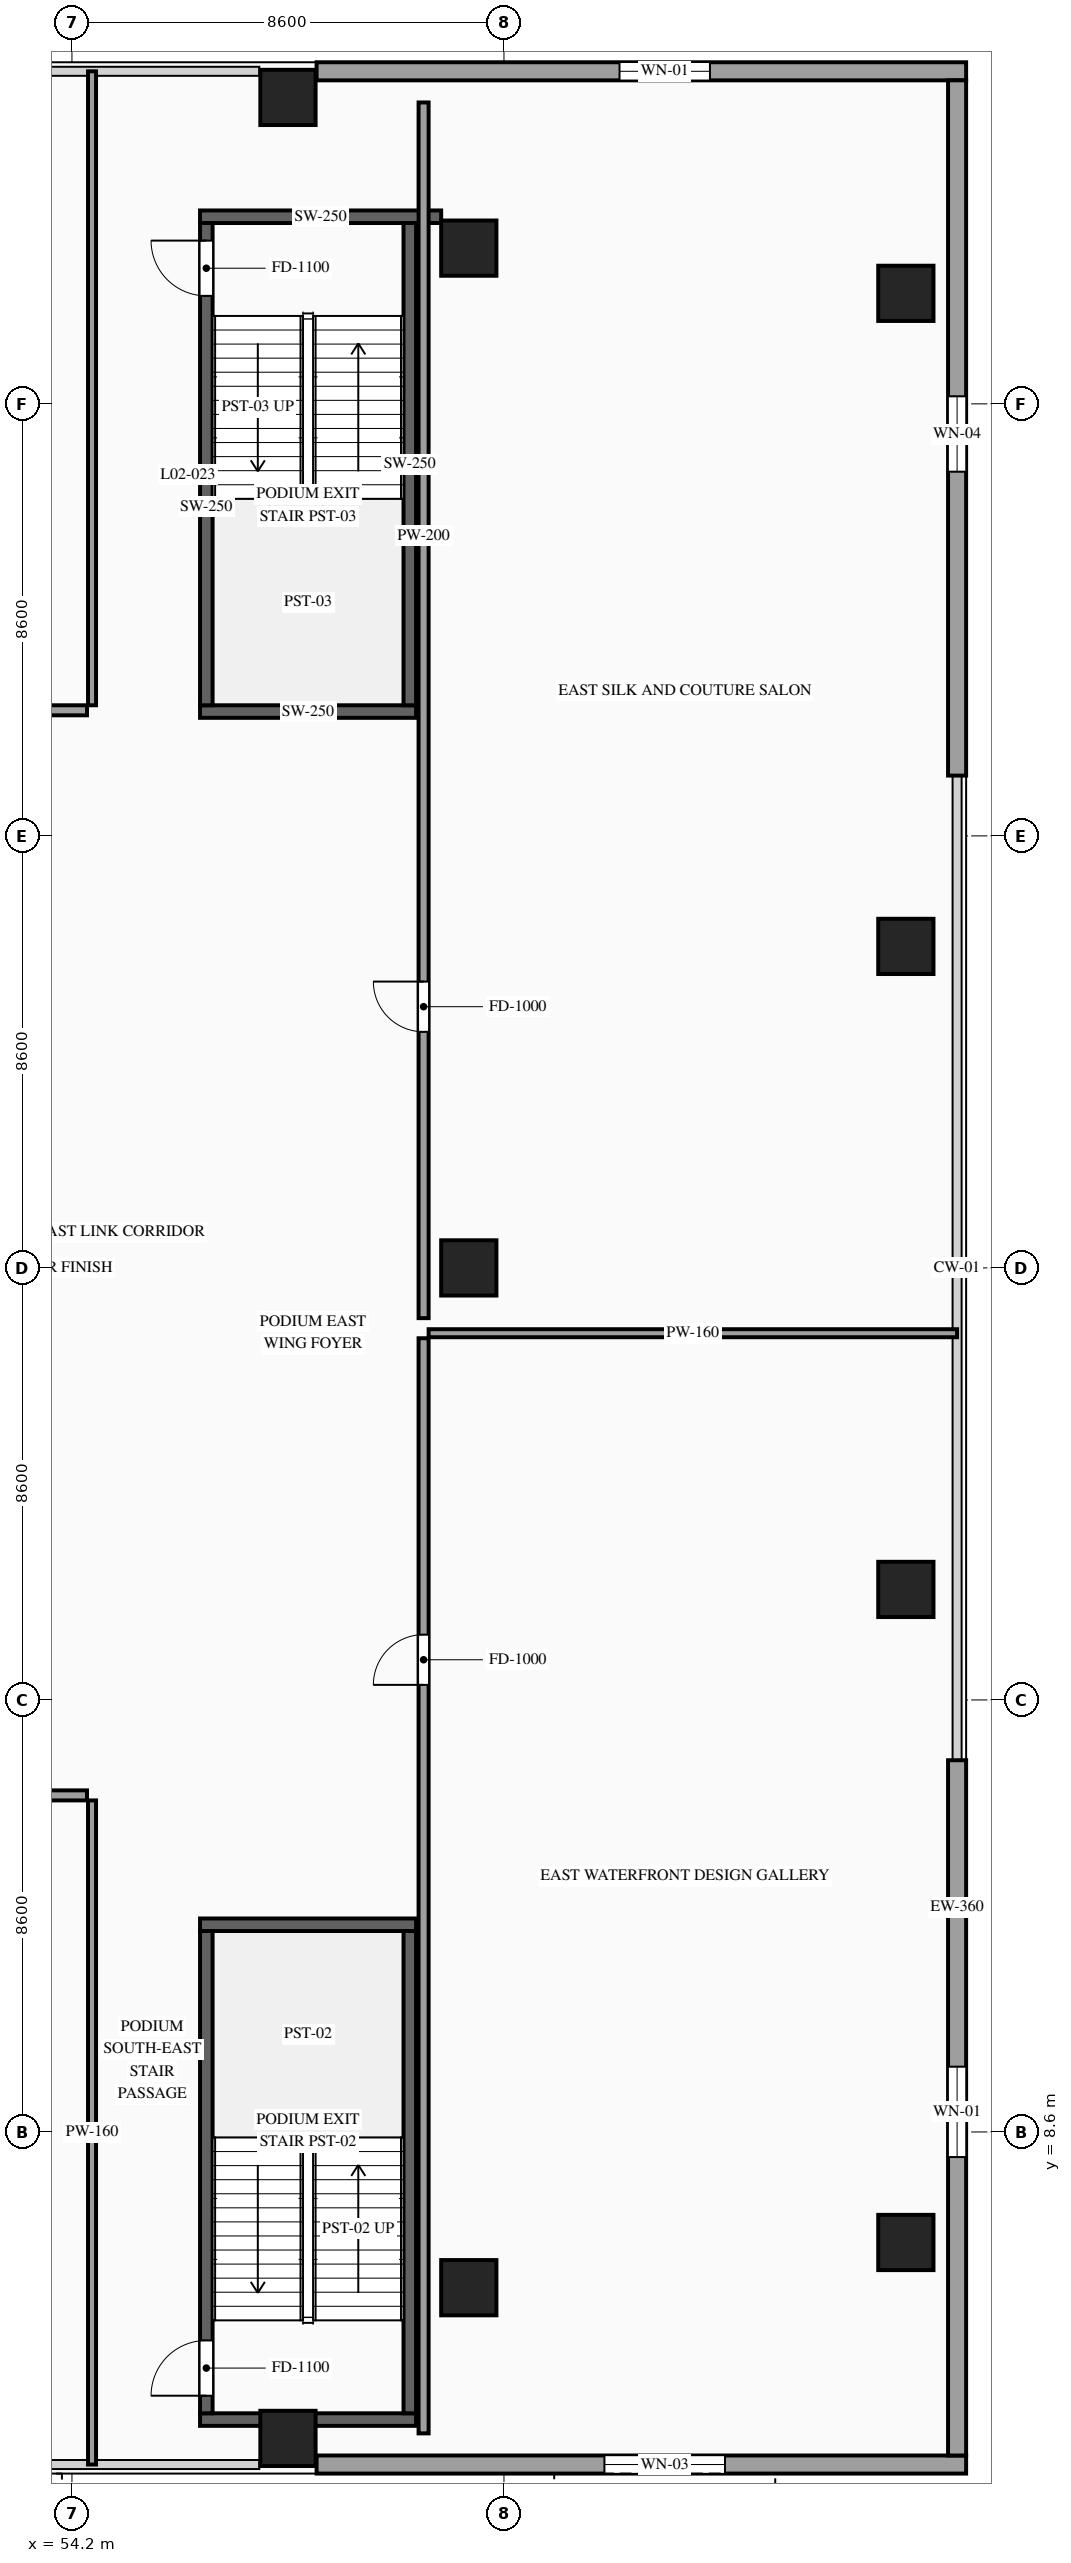
"""IFC4 building model, lengths in metres.
Left out: names, types, materials, properties, quantities, classifications, styles, units other than length and angle.
Written with IfcOpenShell. Run it as: python <this file> out.ifc"""

import sys

from ifc_helpers import new_model, si_unit, direction, frame, frame_2d, origin, origin_2d, place, context, subcontext, project, spatial, rectangle, extrude, source, transform, mapped, element, fill, save


model = new_model("IFC4")
c1 = context("Model", 3, precision=1e-05, world=origin(), true_north=direction((0.0, 1.0)))
c2 = subcontext(c1, "Body", "Model", "MODEL_VIEW")
j1 = project(units=[si_unit("LENGTHUNIT", "METRE"), si_unit("PLANEANGLEUNIT", "RADIAN")], contexts=[c1])
p1 = place(None, origin())
s1 = spatial("IfcSite", under=j1, at=p1, CompositionType="ELEMENT")
p2 = place(p1, origin())
s2 = spatial("IfcBuilding", under=s1, at=p2, CompositionType="ELEMENT")
p3 = place(p2, frame((0.0, 0.0, 5.4)))
s3 = spatial("IfcBuildingStorey", under=s2, at=p3, CompositionType="ELEMENT", Elevation=5.4)
m1 = source(origin(), c2, "Body", "SweptSolid", [
    extrude(rectangle(XDim=1.1, YDim=1.1, at=origin_2d()), origin(), (0.0, 0.0, 1.0), 4.8),
])
for number, where, z_axis, x_axis in (
    (1, (70.8, 6.4, 0.0), (0.0, 0.0, 1.0), (1.0, 0.0, 0.0)),
    (2, (70.8, 19.4, 0.0), (0.0, 0.0, 1.0), (1.0, 0.0, 0.0)),
    (3, (70.8, 32.2, 0.0), (0.0, 0.0, 1.0), (1.0, 0.0, 0.0)),
    (4, (70.8, 45.2, 0.0), (0.0, 0.0, 1.0), (1.0, 0.0, 0.0)),
    (5, (62.1, 5.5, 0.0), (0.0, 0.0, 1.0), (1.0, 0.0, 0.0)),
    (6, (62.1, 25.8, 0.0), (0.0, 0.0, 1.0), (1.0, 0.0, 0.0)),
    (7, (62.1, 46.1, 0.0), (0.0, 0.0, 1.0), (1.0, 0.0, 0.0)),
    (8, (58.5, 2.5, 0.0), (0.0, 0.0, 1.0), (1.0, 0.0, 0.0)),
    (9, (58.5, 49.1, 0.0), (0.0, 0.0, 1.0), (1.0, 0.0, 0.0)),
):
    element("IfcColumn", number, at=place(p3, frame(where, z_axis=z_axis, x_axis=x_axis)), inside=s3, PredefinedType="COLUMN", context=c2, shape_type="MappedRepresentation", body=[
        mapped(m1, transform((0.0, 0.0, 0.0), scale=1.0)),
    ])
p4 = place(p3, frame((59.07, 1.98, 0.0), z_axis=(0.0, 0.0, 1.0), x_axis=(1.0, 0.0, 0.0)))
e10 = element("IfcWall", 10, at=p4, inside=s3, PredefinedType="SOLIDWALL", context=c2, shape_type="SweptSolid", body=[
    extrude(rectangle(XDim=12.93, YDim=0.36, at=frame_2d((6.465, 0.0))), origin(), (0.0, 0.0, 1.0), 4.52),
])
p5 = place(p4, frame((5.73, 0.0, 0.85)))
e11 = element("IfcOpeningElement", 11, at=p5, cuts=e10, PredefinedType="OPENING", context=c2, shape_type="SweptSolid", body=[
    extrude(rectangle(XDim=2.4, YDim=2.4, at=frame_2d((1.2, 1.2))), frame((0.0, 0.195, 0.0), z_axis=(0.0, -1.0, 0.0), x_axis=(1.0, 0.0, 0.0)), (0.0, 0.0, 1.0), 0.39),
])
p6 = place(p3, frame((59.07, 49.62, 0.0), z_axis=(0.0, 0.0, 1.0), x_axis=(1.0, 0.0, 0.0)))
e12 = element("IfcWall", 12, at=p6, inside=s3, PredefinedType="SOLIDWALL", context=c2, shape_type="SweptSolid", body=[
    extrude(rectangle(XDim=12.93, YDim=0.36, at=frame_2d((6.465, 0.0))), origin(), (0.0, 0.0, 1.0), 4.52),
])
p7 = place(p6, frame((6.03, 0.0, 0.9)))
e13 = element("IfcOpeningElement", 13, at=p7, cuts=e12, PredefinedType="OPENING", context=c2, shape_type="SweptSolid", body=[
    extrude(rectangle(XDim=1.8, YDim=2.2, at=frame_2d((0.9, 1.1))), frame((0.0, 0.195, 0.0), z_axis=(0.0, -1.0, 0.0), x_axis=(1.0, 0.0, 0.0)), (0.0, 0.0, 1.0), 0.39),
])
p8 = place(p3, frame((71.82, 2.16, 0.0), z_axis=(0.0, 0.0, 1.0), x_axis=(0.0, 1.0, 0.0)))
e14 = element("IfcWall", 14, at=p8, inside=s3, PredefinedType="SOLIDWALL", context=c2, shape_type="SweptSolid", body=[
    extrude(rectangle(XDim=13.84, YDim=0.36, at=frame_2d((6.92, 0.0))), origin(), (0.0, 0.0, 1.0), 4.52),
])
p9 = place(p8, frame((5.94, 0.0, 0.9)))
e15 = element("IfcOpeningElement", 15, at=p9, cuts=e14, PredefinedType="OPENING", context=c2, shape_type="SweptSolid", body=[
    extrude(rectangle(XDim=1.8, YDim=2.2, at=frame_2d((0.9, 1.1))), frame((0.0, 0.195, 0.0), z_axis=(0.0, -1.0, 0.0), x_axis=(1.0, 0.0, 0.0)), (0.0, 0.0, 1.0), 0.39),
])
p10 = place(p3, frame((71.82, 35.6, 0.0), z_axis=(0.0, 0.0, 1.0), x_axis=(0.0, 1.0, 0.0)))
e16 = element("IfcWall", 16, at=p10, inside=s3, PredefinedType="SOLIDWALL", context=c2, shape_type="SweptSolid", body=[
    extrude(rectangle(XDim=13.84, YDim=0.36, at=frame_2d((6.92, 0.0))), origin(), (0.0, 0.0, 1.0), 4.52),
])
p11 = place(p10, frame((6.05, 0.0, 0.9)))
e17 = element("IfcOpeningElement", 17, at=p11, cuts=e16, PredefinedType="OPENING", context=c2, shape_type="SweptSolid", body=[
    extrude(rectangle(XDim=1.5, YDim=1.8, at=frame_2d((0.75, 0.9))), frame((0.0, 0.195, 0.0), z_axis=(0.0, -1.0, 0.0), x_axis=(1.0, 0.0, 0.0)), (0.0, 0.0, 1.0), 0.39),
])
m2 = source(origin(), c2, "Body", "SweptSolid", [
    extrude(rectangle(XDim=4.3, YDim=0.25, at=frame_2d((2.15, 0.0))), origin(), (0.0, 0.0, 1.0), 4.52),
])
for number, where, z_axis, x_axis in (
    (18, (56.75, 2.875, 0.0), (0.0, 0.0, 1.0), (1.0, 0.0, 0.0)),
    (19, (56.75, 12.725, 0.0), (0.0, 0.0, 1.0), (1.0, 0.0, 0.0)),
):
    element("IfcWall", number, at=place(p3, frame(where, z_axis=z_axis, x_axis=x_axis)), inside=s3, PredefinedType="SOLIDWALL", context=c2, shape_type="MappedRepresentation", body=[
        mapped(m2, transform((0.0, 0.0, 0.0), scale=1.0)),
    ])
p12 = place(p3, frame((56.875, 3.0, 0.0), z_axis=(0.0, 0.0, 1.0), x_axis=(0.0, 1.0, 0.0)))
e20 = element("IfcWall", 20, at=p12, inside=s3, PredefinedType="SOLIDWALL", context=c2, shape_type="SweptSolid", body=[
    extrude(rectangle(XDim=9.6, YDim=0.25, at=frame_2d((4.8, 0.0))), origin(), (0.0, 0.0, 1.0), 4.52),
])
p13 = place(p12, frame((0.35, 0.0, 0.0)))
e21 = element("IfcOpeningElement", 21, at=p13, cuts=e20, PredefinedType="OPENING", context=c2, shape_type="SweptSolid", body=[
    extrude(rectangle(XDim=1.1, YDim=2.2, at=frame_2d((0.55, 1.1))), frame((0.0, 0.14, 0.0), z_axis=(0.0, -1.0, 0.0), x_axis=(1.0, 0.0, 0.0)), (0.0, 0.0, 1.0), 0.28),
])
m3 = source(origin(), c2, "Body", "SweptSolid", [
    extrude(rectangle(XDim=9.6, YDim=0.25, at=frame_2d((4.8, 0.0))), origin(), (0.0, 0.0, 1.0), 4.52),
])
p14 = place(p3, frame((60.925, 3.0, 0.0), z_axis=(0.0, 0.0, 1.0), x_axis=(0.0, 1.0, 0.0)))
e22 = element("IfcWall", 22, at=p14, inside=s3, PredefinedType="SOLIDWALL", context=c2, shape_type="MappedRepresentation", body=[
    mapped(m3, transform((0.0, 0.0, 0.0), scale=1.0)),
])
p15 = place(p3, frame((56.75, 36.875, 0.0), z_axis=(0.0, 0.0, 1.0), x_axis=(1.0, 0.0, 0.0)))
e23 = element("IfcWall", 23, at=p15, inside=s3, PredefinedType="SOLIDWALL", context=c2, shape_type="MappedRepresentation", body=[
    mapped(m2, transform((0.0, 0.0, 0.0), scale=1.0)),
])
m4 = source(origin(), c2, "Body", "SweptSolid", [
    extrude(rectangle(XDim=4.8, YDim=0.25, at=frame_2d((2.4, 0.0))), origin(), (0.0, 0.0, 1.0), 4.52),
])
p16 = place(p3, frame((56.75, 46.725, 0.0), z_axis=(0.0, 0.0, 1.0), x_axis=(1.0, 0.0, 0.0)))
e24 = element("IfcWall", 24, at=p16, inside=s3, PredefinedType="SOLIDWALL", context=c2, shape_type="MappedRepresentation", body=[
    mapped(m4, transform((0.0, 0.0, 0.0), scale=1.0)),
])
p17 = place(p3, frame((56.875, 37.0, 0.0), z_axis=(0.0, 0.0, 1.0), x_axis=(0.0, 1.0, 0.0)))
e25 = element("IfcWall", 25, at=p17, inside=s3, PredefinedType="SOLIDWALL", context=c2, shape_type="SweptSolid", body=[
    extrude(rectangle(XDim=9.6, YDim=0.25, at=frame_2d((4.8, 0.0))), origin(), (0.0, 0.0, 1.0), 4.52),
])
p18 = place(p17, frame((8.15, 0.0, 0.0)))
e26 = element("IfcOpeningElement", 26, at=p18, cuts=e25, PredefinedType="OPENING", context=c2, shape_type="SweptSolid", body=[
    extrude(rectangle(XDim=1.1, YDim=2.2, at=frame_2d((0.55, 1.1))), frame((0.0, 0.14, 0.0), z_axis=(0.0, -1.0, 0.0), x_axis=(1.0, 0.0, 0.0)), (0.0, 0.0, 1.0), 0.28),
])
p19 = place(p3, frame((60.925, 37.0, 0.0), z_axis=(0.0, 0.0, 1.0), x_axis=(0.0, 1.0, 0.0)))
e27 = element("IfcWall", 27, at=p19, inside=s3, PredefinedType="SOLIDWALL", context=c2, shape_type="MappedRepresentation", body=[
    mapped(m3, transform((0.0, 0.0, 0.0), scale=1.0)),
])
p20 = place(p3, frame((43.2, 15.3, 0.0), z_axis=(0.0, 0.0, 1.0), x_axis=(1.0, 0.0, 0.0)))
e28 = element("IfcWall", 28, at=p20, inside=s3, PredefinedType="PARTITIONING", context=c2, shape_type="SweptSolid", body=[
    extrude(rectangle(XDim=11.3, YDim=0.2, at=frame_2d((5.65, 0.0))), origin(), (0.0, 0.0, 1.0), 4.52),
])
p21 = place(p20, frame((5.15, 0.0, 0.0)))
e29 = element("IfcOpeningElement", 29, at=p21, cuts=e28, PredefinedType="OPENING", context=c2, shape_type="SweptSolid", body=[
    extrude(rectangle(XDim=1.0, YDim=2.2, at=frame_2d((0.5, 1.1))), frame((0.0, 0.115, 0.0), z_axis=(0.0, -1.0, 0.0), x_axis=(1.0, 0.0, 0.0)), (0.0, 0.0, 1.0), 0.23),
])
m5 = source(origin(), c2, "Body", "SweptSolid", [
    extrude(rectangle(XDim=13.22, YDim=0.16, at=frame_2d((6.61, 0.0))), origin(), (0.0, 0.0, 1.0), 4.52),
])
p22 = place(p3, frame((54.6, 1.98, 0.0), z_axis=(0.0, 0.0, 1.0), x_axis=(0.0, 1.0, 0.0)))
e30 = element("IfcWall", 30, at=p22, inside=s3, PredefinedType="PARTITIONING", context=c2, shape_type="MappedRepresentation", body=[
    mapped(m5, transform((0.0, 0.0, 0.0), scale=1.0)),
])
p23 = place(p3, frame((61.2, 2.6, 0.0), z_axis=(0.0, 0.0, 1.0), x_axis=(0.0, 1.0, 0.0)))
e31 = element("IfcWall", 31, at=p23, inside=s3, PredefinedType="PARTITIONING", context=c2, shape_type="SweptSolid", body=[
    extrude(rectangle(XDim=21.8, YDim=0.2, at=frame_2d((10.9, 0.0))), origin(), (0.0, 0.0, 1.0), 4.52),
])
p24 = place(p23, frame((14.9, 0.0, 0.0)))
e32 = element("IfcOpeningElement", 32, at=p24, cuts=e31, PredefinedType="OPENING", context=c2, shape_type="SweptSolid", body=[
    extrude(rectangle(XDim=1.0, YDim=2.2, at=frame_2d((0.5, 1.1))), frame((0.0, 0.115, 0.0), z_axis=(0.0, -1.0, 0.0), x_axis=(1.0, 0.0, 0.0)), (0.0, 0.0, 1.0), 0.23),
])
m6 = source(origin(), c2, "Body", "SweptSolid", [
    extrude(rectangle(XDim=10.52, YDim=0.16, at=frame_2d((5.26, 0.0))), origin(), (0.0, 0.0, 1.0), 4.52),
])
p25 = place(p3, frame((61.3, 24.5, 0.0), z_axis=(0.0, 0.0, 1.0), x_axis=(1.0, 0.0, 0.0)))
e33 = element("IfcWall", 33, at=p25, inside=s3, PredefinedType="PARTITIONING", context=c2, shape_type="MappedRepresentation", body=[
    mapped(m6, transform((0.0, 0.0, 0.0), scale=1.0)),
])
p26 = place(p3, frame((61.2, 24.8, 0.0), z_axis=(0.0, 0.0, 1.0), x_axis=(0.0, 1.0, 0.0)))
e34 = element("IfcWall", 34, at=p26, inside=s3, PredefinedType="PARTITIONING", context=c2, shape_type="SweptSolid", body=[
    extrude(rectangle(XDim=24.2, YDim=0.2, at=frame_2d((12.1, 0.0))), origin(), (0.0, 0.0, 1.0), 4.52),
])
p27 = place(p26, frame((5.7, 0.0, 0.0)))
e35 = element("IfcOpeningElement", 35, at=p27, cuts=e34, PredefinedType="OPENING", context=c2, shape_type="SweptSolid", body=[
    extrude(rectangle(XDim=1.0, YDim=2.2, at=frame_2d((0.5, 1.1))), frame((0.0, 0.115, 0.0), z_axis=(0.0, -1.0, 0.0), x_axis=(1.0, 0.0, 0.0)), (0.0, 0.0, 1.0), 0.23),
])
p28 = place(p3, frame((49.4, 36.9, 0.0), z_axis=(0.0, 0.0, 1.0), x_axis=(1.0, 0.0, 0.0)))
e36 = element("IfcWall", 36, at=p28, inside=s3, PredefinedType="PARTITIONING", context=c2, shape_type="SweptSolid", body=[
    extrude(rectangle(XDim=5.1, YDim=0.2, at=frame_2d((2.55, 0.0))), origin(), (0.0, 0.0, 1.0), 4.52),
])
p29 = place(p28, frame((2.0, 0.0, 0.0)))
e37 = element("IfcOpeningElement", 37, at=p29, cuts=e36, PredefinedType="OPENING", context=c2, shape_type="SweptSolid", body=[
    extrude(rectangle(XDim=1.0, YDim=2.2, at=frame_2d((0.5, 1.1))), frame((0.0, 0.115, 0.0), z_axis=(0.0, -1.0, 0.0), x_axis=(1.0, 0.0, 0.0)), (0.0, 0.0, 1.0), 0.23),
])
m7 = source(origin(), c2, "Body", "SweptSolid", [
    extrude(rectangle(XDim=12.62, YDim=0.16, at=frame_2d((6.31, 0.0))), origin(), (0.0, 0.0, 1.0), 4.52),
])
p30 = place(p3, frame((54.6, 37.0, 0.0), z_axis=(0.0, 0.0, 1.0), x_axis=(0.0, 1.0, 0.0)))
e38 = element("IfcWall", 38, at=p30, inside=s3, PredefinedType="PARTITIONING", context=c2, shape_type="MappedRepresentation", body=[
    mapped(m7, transform((0.0, 0.0, 0.0), scale=1.0)),
])
m8 = source(origin(), c2, "Body", "SweptSolid", [
    extrude(rectangle(XDim=2.4, YDim=2.4, at=frame_2d((1.2, 1.2))), frame((0.0, 0.03, 0.0), z_axis=(0.0, -1.0, 0.0), x_axis=(1.0, 0.0, 0.0)), (0.0, 0.0, 1.0), 0.06),
])
p31 = place(p5, origin())
e39 = element("IfcWindow", 39, at=p31, inside=s3, PartitioningType="SINGLE_PANEL", PredefinedType="WINDOW", context=c2, shape_type="MappedRepresentation", body=[
    mapped(m8, transform((0.0, 0.0, 0.0), scale=1.0)),
])
fill(e11, e39)
m9 = source(origin(), c2, "Body", "SweptSolid", [
    extrude(rectangle(XDim=1.8, YDim=2.2, at=frame_2d((0.9, 1.1))), frame((0.0, 0.03, 0.0), z_axis=(0.0, -1.0, 0.0), x_axis=(1.0, 0.0, 0.0)), (0.0, 0.0, 1.0), 0.06),
])
p32 = place(p7, origin())
e40 = element("IfcWindow", 40, at=p32, inside=s3, PartitioningType="SINGLE_PANEL", PredefinedType="WINDOW", context=c2, shape_type="MappedRepresentation", body=[
    mapped(m9, transform((0.0, 0.0, 0.0), scale=1.0)),
])
fill(e13, e40)
p33 = place(p9, origin())
e41 = element("IfcWindow", 41, at=p33, inside=s3, PartitioningType="SINGLE_PANEL", PredefinedType="WINDOW", context=c2, shape_type="MappedRepresentation", body=[
    mapped(m9, transform((0.0, 0.0, 0.0), scale=1.0)),
])
fill(e15, e41)
m10 = source(origin(), c2, "Body", "SweptSolid", [
    extrude(rectangle(XDim=1.5, YDim=1.8, at=frame_2d((0.75, 0.9))), frame((0.0, 0.03, 0.0), z_axis=(0.0, -1.0, 0.0), x_axis=(1.0, 0.0, 0.0)), (0.0, 0.0, 1.0), 0.06),
])
p34 = place(p11, origin())
e42 = element("IfcWindow", 42, at=p34, inside=s3, PartitioningType="SINGLE_PANEL", PredefinedType="WINDOW", context=c2, shape_type="MappedRepresentation", body=[
    mapped(m10, transform((0.0, 0.0, 0.0), scale=1.0)),
])
fill(e17, e42)
m11 = source(origin(), c2, "Body", "SweptSolid", [
    extrude(rectangle(XDim=1.1, YDim=2.2, at=frame_2d((0.55, 1.1))), frame((0.0, 0.025, 0.0), z_axis=(0.0, -1.0, 0.0), x_axis=(1.0, 0.0, 0.0)), (0.0, 0.0, 1.0), 0.05),
])
p35 = place(p13, origin())
e43 = element("IfcDoor", 43, at=p35, inside=s3, OperationType="SINGLE_SWING_LEFT", PredefinedType="DOOR", context=c2, shape_type="MappedRepresentation", body=[
    mapped(m11, transform((0.0, 0.0, 0.0), scale=1.0)),
])
fill(e21, e43)
p36 = place(p18, origin())
e44 = element("IfcDoor", 44, at=p36, inside=s3, OperationType="SINGLE_SWING_RIGHT", PredefinedType="DOOR", context=c2, shape_type="MappedRepresentation", body=[
    mapped(m11, transform((0.0, 0.0, 0.0), scale=1.0)),
])
fill(e26, e44)
m12 = source(origin(), c2, "Body", "SweptSolid", [
    extrude(rectangle(XDim=1.0, YDim=2.2, at=frame_2d((0.5, 1.1))), frame((0.0, 0.025, 0.0), z_axis=(0.0, -1.0, 0.0), x_axis=(1.0, 0.0, 0.0)), (0.0, 0.0, 1.0), 0.05),
])
p37 = place(p24, origin())
e45 = element("IfcDoor", 45, at=p37, inside=s3, OperationType="SINGLE_SWING_LEFT", PredefinedType="DOOR", context=c2, shape_type="MappedRepresentation", body=[
    mapped(m12, transform((0.0, 0.0, 0.0), scale=1.0)),
])
fill(e32, e45)
p38 = place(p27, origin())
e46 = element("IfcDoor", 46, at=p38, inside=s3, OperationType="SINGLE_SWING_RIGHT", PredefinedType="DOOR", context=c2, shape_type="MappedRepresentation", body=[
    mapped(m12, transform((0.0, 0.0, 0.0), scale=1.0)),
])
fill(e35, e46)
save(model, sys.argv[1])
